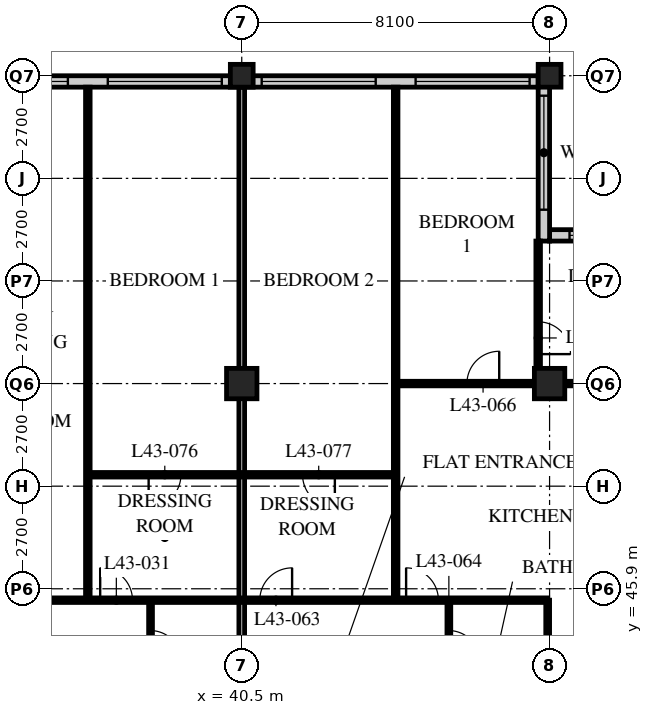
"""IFC4 building model, lengths in metres.
Left out: names, types, materials, properties, quantities, classifications, styles, units other than length and angle.
Written with IfcOpenShell. Run it as: python <this file> out.ifc"""

import sys

from ifc_helpers import new_model, si_unit, direction, frame, frame_2d, origin, origin_2d, place, context, subcontext, project, spatial, rectangle, hollow_rectangle, extrude, element, fill, save


model = new_model("IFC4")
c1 = context("Model", 3, precision=1e-05, world=origin(), true_north=direction((0.0, 1.0)))
c2 = subcontext(c1, "Body", "Model", "MODEL_VIEW")
j1 = project(units=[si_unit("LENGTHUNIT", "METRE"), si_unit("PLANEANGLEUNIT", "RADIAN")], contexts=[c1])
p1 = place(None, origin())
s1 = spatial("IfcSite", under=j1, at=p1, CompositionType="ELEMENT")
p2 = place(p1, origin())
s2 = spatial("IfcBuilding", under=s1, at=p2, CompositionType="ELEMENT")
p3 = place(p2, frame((0.0, 0.0, 170.4)))
s3 = spatial("IfcBuildingStorey", under=s2, at=p3, CompositionType="ELEMENT", Elevation=170.4)
p4 = place(p3, frame((40.5, 51.3, 0.0), z_axis=(0.0, 0.0, 1.0), x_axis=(1.0, 0.0, 0.0)))
e1 = element("IfcColumn", 1, at=p4, inside=s3, PredefinedType="COLUMN", context=c2, shape_type="SweptSolid", body=[
    extrude(hollow_rectangle(XDim=0.8, YDim=0.8, WallThickness=0.08, at=origin_2d()), origin(), (0.0, 0.0, 1.0), 3.6),
])
p5 = place(p3, frame((40.5, 59.4, 0.0), z_axis=(0.0, 0.0, 1.0), x_axis=(1.0, 0.0, 0.0)))
e2 = element("IfcColumn", 2, at=p5, inside=s3, PredefinedType="COLUMN", context=c2, shape_type="SweptSolid", body=[
    extrude(hollow_rectangle(XDim=0.6, YDim=0.6, WallThickness=0.05, at=origin_2d()), origin(), (0.0, 0.0, 1.0), 3.6),
])
p6 = place(p3, frame((48.6, 51.3, 0.0), z_axis=(0.0, 0.0, 1.0), x_axis=(1.0, 0.0, 0.0)))
e3 = element("IfcColumn", 3, at=p6, inside=s3, PredefinedType="COLUMN", context=c2, shape_type="SweptSolid", body=[
    extrude(hollow_rectangle(XDim=0.8, YDim=0.8, WallThickness=0.08, at=origin_2d()), origin(), (0.0, 0.0, 1.0), 3.6),
])
p7 = place(p3, frame((48.6, 59.4, 0.0), z_axis=(0.0, 0.0, 1.0), x_axis=(1.0, 0.0, 0.0)))
e4 = element("IfcColumn", 4, at=p7, inside=s3, PredefinedType="COLUMN", context=c2, shape_type="SweptSolid", body=[
    extrude(hollow_rectangle(XDim=0.6, YDim=0.6, WallThickness=0.05, at=origin_2d()), origin(), (0.0, 0.0, 1.0), 3.6),
])
p8 = place(p3, frame((52.35, 55.2, 0.0), z_axis=(0.0, 0.0, 1.0), x_axis=(-1.0, 0.0, 0.0)))
e5 = element("IfcWall", 5, at=p8, inside=s3, PredefinedType="SOLIDWALL", context=c2, shape_type="SweptSolid", body=[
    extrude(rectangle(XDim=3.75, YDim=0.3, at=frame_2d((1.875, 0.0))), origin(), (0.0, 0.0, 1.0), 3.39),
])
p9 = place(p8, frame((0.225, 0.0, 0.6)))
e6 = element("IfcOpeningElement", 6, at=p9, cuts=e5, PredefinedType="OPENING", context=c2, shape_type="SweptSolid", body=[
    extrude(rectangle(XDim=3.0, YDim=2.0, at=frame_2d((1.5, 1.0))), frame((0.0, 0.16, 0.0), z_axis=(0.0, -1.0, 0.0), x_axis=(1.0, 0.0, 0.0)), (0.0, 0.0, 1.0), 0.32),
])
p10 = place(p3, frame((48.45, 55.05, 0.0), z_axis=(0.0, 0.0, 1.0), x_axis=(0.0, 1.0, 0.0)))
e7 = element("IfcWall", 7, at=p10, inside=s3, PredefinedType="SOLIDWALL", context=c2, shape_type="SweptSolid", body=[
    extrude(rectangle(XDim=4.35, YDim=0.3, at=frame_2d((2.175, 0.0))), origin(), (0.0, 0.0, 1.0), 3.39),
])
p11 = place(p10, frame((0.825, 0.0, 0.6)))
e8 = element("IfcOpeningElement", 8, at=p11, cuts=e7, PredefinedType="OPENING", context=c2, shape_type="SweptSolid", body=[
    extrude(rectangle(XDim=3.0, YDim=2.0, at=frame_2d((1.5, 1.0))), frame((0.0, 0.16, 0.0), z_axis=(0.0, -1.0, 0.0), x_axis=(1.0, 0.0, 0.0)), (0.0, 0.0, 1.0), 0.32),
])
p12 = place(p3, frame((48.3, 59.25, 0.0), z_axis=(0.0, 0.0, 1.0), x_axis=(-1.0, 0.0, 0.0)))
e9 = element("IfcWall", 9, at=p12, inside=s3, PredefinedType="SOLIDWALL", context=c2, shape_type="SweptSolid", body=[
    extrude(rectangle(XDim=40.2, YDim=0.3, at=frame_2d((20.1, 0.0))), origin(), (0.0, 0.0, 1.0), 3.39),
])
p13 = place(p12, frame((0.225, 0.0, 0.6)))
e10 = element("IfcOpeningElement", 10, at=p13, cuts=e9, PredefinedType="OPENING", context=c2, shape_type="SweptSolid", body=[
    extrude(rectangle(XDim=3.0, YDim=2.4, at=frame_2d((1.5, 1.2))), frame((0.0, 0.16, 0.0), z_axis=(0.0, -1.0, 0.0), x_axis=(1.0, 0.0, 0.0)), (0.0, 0.0, 1.0), 0.32),
])
p14 = place(p12, frame((4.275, 0.0, 0.6)))
e11 = element("IfcOpeningElement", 11, at=p14, cuts=e9, PredefinedType="OPENING", context=c2, shape_type="SweptSolid", body=[
    extrude(rectangle(XDim=3.0, YDim=2.4, at=frame_2d((1.5, 1.2))), frame((0.0, 0.16, 0.0), z_axis=(0.0, -1.0, 0.0), x_axis=(1.0, 0.0, 0.0)), (0.0, 0.0, 1.0), 0.32),
])
p15 = place(p12, frame((8.325, 0.0, 0.6)))
e12 = element("IfcOpeningElement", 12, at=p15, cuts=e9, PredefinedType="OPENING", context=c2, shape_type="SweptSolid", body=[
    extrude(rectangle(XDim=3.0, YDim=2.4, at=frame_2d((1.5, 1.2))), frame((0.0, 0.16, 0.0), z_axis=(0.0, -1.0, 0.0), x_axis=(1.0, 0.0, 0.0)), (0.0, 0.0, 1.0), 0.32),
])
p16 = place(p12, frame((12.375, 0.0, 0.6)))
e13 = element("IfcOpeningElement", 13, at=p16, cuts=e9, PredefinedType="OPENING", context=c2, shape_type="SweptSolid", body=[
    extrude(rectangle(XDim=3.0, YDim=2.4, at=frame_2d((1.5, 1.2))), frame((0.0, 0.16, 0.0), z_axis=(0.0, -1.0, 0.0), x_axis=(1.0, 0.0, 0.0)), (0.0, 0.0, 1.0), 0.32),
])
p17 = place(p12, frame((16.425, 0.0, 0.6)))
e14 = element("IfcOpeningElement", 14, at=p17, cuts=e9, PredefinedType="OPENING", context=c2, shape_type="SweptSolid", body=[
    extrude(rectangle(XDim=3.0, YDim=2.4, at=frame_2d((1.5, 1.2))), frame((0.0, 0.16, 0.0), z_axis=(0.0, -1.0, 0.0), x_axis=(1.0, 0.0, 0.0)), (0.0, 0.0, 1.0), 0.32),
])
p18 = place(p12, frame((20.475, 0.0, 0.6)))
e15 = element("IfcOpeningElement", 15, at=p18, cuts=e9, PredefinedType="OPENING", context=c2, shape_type="SweptSolid", body=[
    extrude(rectangle(XDim=3.0, YDim=2.4, at=frame_2d((1.5, 1.2))), frame((0.0, 0.16, 0.0), z_axis=(0.0, -1.0, 0.0), x_axis=(1.0, 0.0, 0.0)), (0.0, 0.0, 1.0), 0.32),
])
p19 = place(p12, frame((24.525, 0.0, 0.6)))
e16 = element("IfcOpeningElement", 16, at=p19, cuts=e9, PredefinedType="OPENING", context=c2, shape_type="SweptSolid", body=[
    extrude(rectangle(XDim=3.0, YDim=2.4, at=frame_2d((1.5, 1.2))), frame((0.0, 0.16, 0.0), z_axis=(0.0, -1.0, 0.0), x_axis=(1.0, 0.0, 0.0)), (0.0, 0.0, 1.0), 0.32),
])
p20 = place(p12, frame((28.575, 0.0, 0.6)))
e17 = element("IfcOpeningElement", 17, at=p20, cuts=e9, PredefinedType="OPENING", context=c2, shape_type="SweptSolid", body=[
    extrude(rectangle(XDim=3.0, YDim=2.4, at=frame_2d((1.5, 1.2))), frame((0.0, 0.16, 0.0), z_axis=(0.0, -1.0, 0.0), x_axis=(1.0, 0.0, 0.0)), (0.0, 0.0, 1.0), 0.32),
])
p21 = place(p12, frame((32.625, 0.0, 0.6)))
e18 = element("IfcOpeningElement", 18, at=p21, cuts=e9, PredefinedType="OPENING", context=c2, shape_type="SweptSolid", body=[
    extrude(rectangle(XDim=3.0, YDim=2.4, at=frame_2d((1.5, 1.2))), frame((0.0, 0.16, 0.0), z_axis=(0.0, -1.0, 0.0), x_axis=(1.0, 0.0, 0.0)), (0.0, 0.0, 1.0), 0.32),
])
p22 = place(p12, frame((36.675, 0.0, 0.6)))
e19 = element("IfcOpeningElement", 19, at=p22, cuts=e9, PredefinedType="OPENING", context=c2, shape_type="SweptSolid", body=[
    extrude(rectangle(XDim=3.0, YDim=2.4, at=frame_2d((1.5, 1.2))), frame((0.0, 0.16, 0.0), z_axis=(0.0, -1.0, 0.0), x_axis=(1.0, 0.0, 0.0)), (0.0, 0.0, 1.0), 0.32),
])
p23 = place(p3, frame((38.1, 43.2, 0.0), z_axis=(0.0, 0.0, 1.0), x_axis=(0.0, 1.0, 0.0)))
e20 = element("IfcWall", 20, at=p23, inside=s3, PredefinedType="PARTITIONING", context=c2, shape_type="SweptSolid", body=[
    extrude(rectangle(XDim=2.4, YDim=0.1, at=frame_2d((1.2, 0.0))), origin(), (0.0, 0.0, 1.0), 3.39),
])
p24 = place(p23, frame((0.8, 0.0, 0.0)))
e21 = element("IfcOpeningElement", 21, at=p24, cuts=e20, PredefinedType="OPENING", context=c2, shape_type="SweptSolid", body=[
    extrude(rectangle(XDim=0.8, YDim=2.1, at=frame_2d((0.4, 1.05))), frame((0.0, 0.06, 0.0), z_axis=(0.0, -1.0, 0.0), x_axis=(1.0, 0.0, 0.0)), (0.0, 0.0, 1.0), 0.12),
])
p25 = place(p3, frame((36.45, 45.6, 0.0), z_axis=(0.0, 0.0, 1.0), x_axis=(0.0, 1.0, 0.0)))
e22 = element("IfcWall", 22, at=p25, inside=s3, PredefinedType="PARTITIONING", context=c2, shape_type="SweptSolid", body=[
    extrude(rectangle(XDim=13.5, YDim=0.12, at=frame_2d((6.75, 0.0))), origin(), (0.0, 0.0, 1.0), 3.39),
])
p26 = place(p3, frame((45.95, 43.2, 0.0), z_axis=(0.0, 0.0, 1.0), x_axis=(0.0, 1.0, 0.0)))
e23 = element("IfcWall", 23, at=p26, inside=s3, PredefinedType="PARTITIONING", context=c2, shape_type="SweptSolid", body=[
    extrude(rectangle(XDim=2.4, YDim=0.1, at=frame_2d((1.2, 0.0))), origin(), (0.0, 0.0, 1.0), 3.39),
])
p27 = place(p26, frame((0.8, 0.0, 0.0)))
e24 = element("IfcOpeningElement", 24, at=p27, cuts=e23, PredefinedType="OPENING", context=c2, shape_type="SweptSolid", body=[
    extrude(rectangle(XDim=0.8, YDim=2.1, at=frame_2d((0.4, 1.05))), frame((0.0, 0.06, 0.0), z_axis=(0.0, -1.0, 0.0), x_axis=(1.0, 0.0, 0.0)), (0.0, 0.0, 1.0), 0.12),
])
p28 = place(p3, frame((48.55, 43.2, 0.0), z_axis=(0.0, 0.0, 1.0), x_axis=(0.0, 1.0, 0.0)))
e25 = element("IfcWall", 25, at=p28, inside=s3, PredefinedType="PARTITIONING", context=c2, shape_type="SweptSolid", body=[
    extrude(rectangle(XDim=2.4, YDim=0.1, at=frame_2d((1.2, 0.0))), origin(), (0.0, 0.0, 1.0), 2.778),
])
p29 = place(p3, frame((44.55, 45.6, 0.0), z_axis=(0.0, 0.0, 1.0), x_axis=(0.0, 1.0, 0.0)))
e26 = element("IfcWall", 26, at=p29, inside=s3, PredefinedType="PARTITIONING", context=c2, shape_type="SweptSolid", body=[
    extrude(rectangle(XDim=13.5, YDim=0.12, at=frame_2d((6.75, 0.0))), origin(), (0.0, 0.0, 1.0), 3.39),
])
p30 = place(p3, frame((44.55, 51.3, 0.0), z_axis=(0.0, 0.0, 1.0), x_axis=(1.0, 0.0, 0.0)))
e27 = element("IfcWall", 27, at=p30, inside=s3, PredefinedType="PARTITIONING", context=c2, shape_type="SweptSolid", body=[
    extrude(rectangle(XDim=7.8, YDim=0.12, at=frame_2d((3.9, 0.0))), origin(), (0.0, 0.0, 1.0), 2.778),
])
p31 = place(p30, frame((1.875, 0.0, 0.0)))
e28 = element("IfcOpeningElement", 28, at=p31, cuts=e27, PredefinedType="OPENING", context=c2, shape_type="SweptSolid", body=[
    extrude(rectangle(XDim=0.85, YDim=2.1, at=frame_2d((0.425, 1.05))), frame((0.0, 0.07, 0.0), z_axis=(0.0, -1.0, 0.0), x_axis=(1.0, 0.0, 0.0)), (0.0, 0.0, 1.0), 0.14),
])
p32 = place(p3, frame((40.5, 43.2, 0.0), z_axis=(0.0, 0.0, 1.0), x_axis=(0.0, 1.0, 0.0)))
e29 = element("IfcWall", 29, at=p32, inside=s3, PredefinedType="PARTITIONING", context=c2, shape_type="SweptSolid", body=[
    extrude(rectangle(XDim=15.9, YDim=0.15, at=frame_2d((7.95, 0.0))), origin(), (0.0, 0.0, 1.0), 2.778),
])
p33 = place(p3, frame((8.15, 45.6, 0.0), z_axis=(0.0, 0.0, 1.0), x_axis=(1.0, 0.0, 0.0)))
e30 = element("IfcWall", 30, at=p33, inside=s3, PredefinedType="PARTITIONING", context=c2, shape_type="SweptSolid", body=[
    extrude(rectangle(XDim=40.4, YDim=0.12, at=frame_2d((20.2, 0.0))), origin(), (0.0, 0.0, 1.0), 3.39),
])
p34 = place(p33, frame((9.025, 0.0, 0.0)))
e31 = element("IfcOpeningElement", 31, at=p34, cuts=e30, PredefinedType="OPENING", context=c2, shape_type="SweptSolid", body=[
    extrude(rectangle(XDim=0.85, YDim=2.1, at=frame_2d((0.425, 1.05))), frame((0.0, 0.07, 0.0), z_axis=(0.0, -1.0, 0.0), x_axis=(1.0, 0.0, 0.0)), (0.0, 0.0, 1.0), 0.14),
])
p35 = place(p33, frame((12.425, 0.0, 0.0)))
e32 = element("IfcOpeningElement", 32, at=p35, cuts=e30, PredefinedType="OPENING", context=c2, shape_type="SweptSolid", body=[
    extrude(rectangle(XDim=0.85, YDim=2.1, at=frame_2d((0.425, 1.05))), frame((0.0, 0.07, 0.0), z_axis=(0.0, -1.0, 0.0), x_axis=(1.0, 0.0, 0.0)), (0.0, 0.0, 1.0), 0.14),
])
p36 = place(p33, frame((17.125, 0.0, 0.0)))
e33 = element("IfcOpeningElement", 33, at=p36, cuts=e30, PredefinedType="OPENING", context=c2, shape_type="SweptSolid", body=[
    extrude(rectangle(XDim=0.85, YDim=2.1, at=frame_2d((0.425, 1.05))), frame((0.0, 0.07, 0.0), z_axis=(0.0, -1.0, 0.0), x_axis=(1.0, 0.0, 0.0)), (0.0, 0.0, 1.0), 0.14),
])
p37 = place(p33, frame((20.525, 0.0, 0.0)))
e34 = element("IfcOpeningElement", 34, at=p37, cuts=e30, PredefinedType="OPENING", context=c2, shape_type="SweptSolid", body=[
    extrude(rectangle(XDim=0.85, YDim=2.1, at=frame_2d((0.425, 1.05))), frame((0.0, 0.07, 0.0), z_axis=(0.0, -1.0, 0.0), x_axis=(1.0, 0.0, 0.0)), (0.0, 0.0, 1.0), 0.14),
])
p38 = place(p33, frame((25.225, 0.0, 0.0)))
e35 = element("IfcOpeningElement", 35, at=p38, cuts=e30, PredefinedType="OPENING", context=c2, shape_type="SweptSolid", body=[
    extrude(rectangle(XDim=0.85, YDim=2.1, at=frame_2d((0.425, 1.05))), frame((0.0, 0.07, 0.0), z_axis=(0.0, -1.0, 0.0), x_axis=(1.0, 0.0, 0.0)), (0.0, 0.0, 1.0), 0.14),
])
p39 = place(p33, frame((28.625, 0.0, 0.0)))
e36 = element("IfcOpeningElement", 36, at=p39, cuts=e30, PredefinedType="OPENING", context=c2, shape_type="SweptSolid", body=[
    extrude(rectangle(XDim=0.85, YDim=2.1, at=frame_2d((0.425, 1.05))), frame((0.0, 0.07, 0.0), z_axis=(0.0, -1.0, 0.0), x_axis=(1.0, 0.0, 0.0)), (0.0, 0.0, 1.0), 0.14),
])
p40 = place(p33, frame((32.825, 0.0, 0.0)))
e37 = element("IfcOpeningElement", 37, at=p40, cuts=e30, PredefinedType="OPENING", context=c2, shape_type="SweptSolid", body=[
    extrude(rectangle(XDim=0.85, YDim=2.1, at=frame_2d((0.425, 1.05))), frame((0.0, 0.07, 0.0), z_axis=(0.0, -1.0, 0.0), x_axis=(1.0, 0.0, 0.0)), (0.0, 0.0, 1.0), 0.14),
])
p41 = place(p33, frame((36.675, 0.0, 0.0)))
e38 = element("IfcOpeningElement", 38, at=p41, cuts=e30, PredefinedType="OPENING", context=c2, shape_type="SweptSolid", body=[
    extrude(rectangle(XDim=0.85, YDim=2.1, at=frame_2d((0.425, 1.05))), frame((0.0, 0.07, 0.0), z_axis=(0.0, -1.0, 0.0), x_axis=(1.0, 0.0, 0.0)), (0.0, 0.0, 1.0), 0.14),
])
p42 = place(p33, frame((6.725, 0.0, 0.0)))
e39 = element("IfcOpeningElement", 39, at=p42, cuts=e30, PredefinedType="OPENING", context=c2, shape_type="SweptSolid", body=[
    extrude(rectangle(XDim=0.85, YDim=2.1, at=frame_2d((0.425, 1.05))), frame((0.0, 0.07, 0.0), z_axis=(0.0, -1.0, 0.0), x_axis=(1.0, 0.0, 0.0)), (0.0, 0.0, 1.0), 0.14),
])
p43 = place(p33, frame((2.875, 0.0, 0.0)))
e40 = element("IfcOpeningElement", 40, at=p43, cuts=e30, PredefinedType="OPENING", context=c2, shape_type="SweptSolid", body=[
    extrude(rectangle(XDim=0.85, YDim=2.1, at=frame_2d((0.425, 1.05))), frame((0.0, 0.07, 0.0), z_axis=(0.0, -1.0, 0.0), x_axis=(1.0, 0.0, 0.0)), (0.0, 0.0, 1.0), 0.14),
])
p44 = place(p3, frame((48.3, 51.3, 0.0), z_axis=(0.0, 0.0, 1.0), x_axis=(0.0, 1.0, 0.0)))
e41 = element("IfcWall", 41, at=p44, inside=s3, PredefinedType="PARTITIONING", context=c2, shape_type="SweptSolid", body=[
    extrude(rectangle(XDim=3.75, YDim=0.12, at=frame_2d((1.875, 0.0))), origin(), (0.0, 0.0, 1.0), 3.39),
])
p45 = place(p44, frame((0.775, 0.0, 0.0)))
e42 = element("IfcOpeningElement", 42, at=p45, cuts=e41, PredefinedType="OPENING", context=c2, shape_type="SweptSolid", body=[
    extrude(rectangle(XDim=0.85, YDim=2.1, at=frame_2d((0.425, 1.05))), frame((0.0, 0.07, 0.0), z_axis=(0.0, -1.0, 0.0), x_axis=(1.0, 0.0, 0.0)), (0.0, 0.0, 1.0), 0.14),
])
p46 = place(p3, frame((36.45, 48.9, 0.0), z_axis=(0.0, 0.0, 1.0), x_axis=(1.0, 0.0, 0.0)))
e43 = element("IfcWall", 43, at=p46, inside=s3, PredefinedType="PARTITIONING", context=c2, shape_type="SweptSolid", body=[
    extrude(rectangle(XDim=8.1, YDim=0.12, at=frame_2d((4.05, 0.0))), origin(), (0.0, 0.0, 1.0), 3.39),
])
p47 = place(p46, frame((1.6, 0.0, 0.0)))
e44 = element("IfcOpeningElement", 44, at=p47, cuts=e43, PredefinedType="OPENING", context=c2, shape_type="SweptSolid", body=[
    extrude(rectangle(XDim=0.85, YDim=2.1, at=frame_2d((0.425, 1.05))), frame((0.0, 0.07, 0.0), z_axis=(0.0, -1.0, 0.0), x_axis=(1.0, 0.0, 0.0)), (0.0, 0.0, 1.0), 0.14),
])
p48 = place(p46, frame((5.65, 0.0, 0.0)))
e45 = element("IfcOpeningElement", 45, at=p48, cuts=e43, PredefinedType="OPENING", context=c2, shape_type="SweptSolid", body=[
    extrude(rectangle(XDim=0.85, YDim=2.1, at=frame_2d((0.425, 1.05))), frame((0.0, 0.07, 0.0), z_axis=(0.0, -1.0, 0.0), x_axis=(1.0, 0.0, 0.0)), (0.0, 0.0, 1.0), 0.14),
])
p49 = place(p9, origin())
e46 = element("IfcWindow", 46, at=p49, inside=s3, PartitioningType="SINGLE_PANEL", PredefinedType="WINDOW", context=c2, shape_type="SweptSolid", body=[
    extrude(rectangle(XDim=3.0, YDim=2.0, at=frame_2d((1.5, 1.0))), frame((0.0, 0.03, 0.0), z_axis=(0.0, -1.0, 0.0), x_axis=(1.0, 0.0, 0.0)), (0.0, 0.0, 1.0), 0.06),
])
fill(e6, e46)
p50 = place(p11, origin())
e47 = element("IfcWindow", 47, at=p50, inside=s3, PartitioningType="SINGLE_PANEL", PredefinedType="WINDOW", context=c2, shape_type="SweptSolid", body=[
    extrude(rectangle(XDim=3.0, YDim=2.0, at=frame_2d((1.5, 1.0))), frame((0.0, 0.03, 0.0), z_axis=(0.0, -1.0, 0.0), x_axis=(1.0, 0.0, 0.0)), (0.0, 0.0, 1.0), 0.06),
])
fill(e8, e47)
p51 = place(p13, origin())
e48 = element("IfcWindow", 48, at=p51, inside=s3, PartitioningType="SINGLE_PANEL", PredefinedType="WINDOW", context=c2, shape_type="SweptSolid", body=[
    extrude(rectangle(XDim=3.0, YDim=2.4, at=frame_2d((1.5, 1.2))), frame((0.0, 0.03, 0.0), z_axis=(0.0, -1.0, 0.0), x_axis=(1.0, 0.0, 0.0)), (0.0, 0.0, 1.0), 0.06),
])
fill(e10, e48)
p52 = place(p14, origin())
e49 = element("IfcWindow", 49, at=p52, inside=s3, PartitioningType="SINGLE_PANEL", PredefinedType="WINDOW", context=c2, shape_type="SweptSolid", body=[
    extrude(rectangle(XDim=3.0, YDim=2.4, at=frame_2d((1.5, 1.2))), frame((0.0, 0.03, 0.0), z_axis=(0.0, -1.0, 0.0), x_axis=(1.0, 0.0, 0.0)), (0.0, 0.0, 1.0), 0.06),
])
fill(e11, e49)
p53 = place(p15, origin())
e50 = element("IfcWindow", 50, at=p53, inside=s3, PartitioningType="SINGLE_PANEL", PredefinedType="WINDOW", context=c2, shape_type="SweptSolid", body=[
    extrude(rectangle(XDim=3.0, YDim=2.4, at=frame_2d((1.5, 1.2))), frame((0.0, 0.03, 0.0), z_axis=(0.0, -1.0, 0.0), x_axis=(1.0, 0.0, 0.0)), (0.0, 0.0, 1.0), 0.06),
])
fill(e12, e50)
p54 = place(p16, origin())
e51 = element("IfcWindow", 51, at=p54, inside=s3, PartitioningType="SINGLE_PANEL", PredefinedType="WINDOW", context=c2, shape_type="SweptSolid", body=[
    extrude(rectangle(XDim=3.0, YDim=2.4, at=frame_2d((1.5, 1.2))), frame((0.0, 0.03, 0.0), z_axis=(0.0, -1.0, 0.0), x_axis=(1.0, 0.0, 0.0)), (0.0, 0.0, 1.0), 0.06),
])
fill(e13, e51)
p55 = place(p24, origin())
e52 = element("IfcDoor", 52, at=p55, inside=s3, OperationType="SINGLE_SWING_RIGHT", PredefinedType="DOOR", context=c2, shape_type="SweptSolid", body=[
    extrude(rectangle(XDim=0.8, YDim=2.1, at=frame_2d((0.4, 1.05))), frame((0.0, 0.025, 0.0), z_axis=(0.0, -1.0, 0.0), x_axis=(1.0, 0.0, 0.0)), (0.0, 0.0, 1.0), 0.05),
])
fill(e21, e52)
p56 = place(p39, origin())
e53 = element("IfcDoor", 53, at=p56, inside=s3, OperationType="SINGLE_SWING_LEFT", PredefinedType="DOOR", context=c2, shape_type="SweptSolid", body=[
    extrude(rectangle(XDim=0.85, YDim=2.1, at=frame_2d((0.425, 1.05))), frame((0.0, 0.025, 0.0), z_axis=(0.0, -1.0, 0.0), x_axis=(1.0, 0.0, 0.0)), (0.0, 0.0, 1.0), 0.05),
])
fill(e36, e53)
p57 = place(p40, origin())
e54 = element("IfcDoor", 54, at=p57, inside=s3, OperationType="SINGLE_SWING_RIGHT", PredefinedType="DOOR", context=c2, shape_type="SweptSolid", body=[
    extrude(rectangle(XDim=0.85, YDim=2.1, at=frame_2d((0.425, 1.05))), frame((0.0, 0.025, 0.0), z_axis=(0.0, -1.0, 0.0), x_axis=(1.0, 0.0, 0.0)), (0.0, 0.0, 1.0), 0.05),
])
fill(e37, e54)
p58 = place(p27, origin())
e55 = element("IfcDoor", 55, at=p58, inside=s3, OperationType="SINGLE_SWING_RIGHT", PredefinedType="DOOR", context=c2, shape_type="SweptSolid", body=[
    extrude(rectangle(XDim=0.8, YDim=2.1, at=frame_2d((0.4, 1.05))), frame((0.0, 0.025, 0.0), z_axis=(0.0, -1.0, 0.0), x_axis=(1.0, 0.0, 0.0)), (0.0, 0.0, 1.0), 0.05),
])
fill(e24, e55)
p59 = place(p41, origin())
e56 = element("IfcDoor", 56, at=p59, inside=s3, OperationType="SINGLE_SWING_LEFT", PredefinedType="DOOR", context=c2, shape_type="SweptSolid", body=[
    extrude(rectangle(XDim=0.85, YDim=2.1, at=frame_2d((0.425, 1.05))), frame((0.0, 0.025, 0.0), z_axis=(0.0, -1.0, 0.0), x_axis=(1.0, 0.0, 0.0)), (0.0, 0.0, 1.0), 0.05),
])
fill(e38, e56)
p60 = place(p31, origin())
e57 = element("IfcDoor", 57, at=p60, inside=s3, OperationType="SINGLE_SWING_RIGHT", PredefinedType="DOOR", context=c2, shape_type="SweptSolid", body=[
    extrude(rectangle(XDim=0.85, YDim=2.1, at=frame_2d((0.425, 1.05))), frame((0.0, 0.025, 0.0), z_axis=(0.0, -1.0, 0.0), x_axis=(1.0, 0.0, 0.0)), (0.0, 0.0, 1.0), 0.05),
])
fill(e28, e57)
p61 = place(p45, origin())
e58 = element("IfcDoor", 58, at=p61, inside=s3, OperationType="SINGLE_SWING_RIGHT", PredefinedType="DOOR", context=c2, shape_type="SweptSolid", body=[
    extrude(rectangle(XDim=0.85, YDim=2.1, at=frame_2d((0.425, 1.05))), frame((0.0, 0.025, 0.0), z_axis=(0.0, -1.0, 0.0), x_axis=(1.0, 0.0, 0.0)), (0.0, 0.0, 1.0), 0.05),
])
fill(e42, e58)
p62 = place(p47, origin())
e59 = element("IfcDoor", 59, at=p62, inside=s3, OperationType="SINGLE_SWING_RIGHT", PredefinedType="DOOR", context=c2, shape_type="SweptSolid", body=[
    extrude(rectangle(XDim=0.85, YDim=2.1, at=frame_2d((0.425, 1.05))), frame((0.0, 0.025, 0.0), z_axis=(0.0, -1.0, 0.0), x_axis=(1.0, 0.0, 0.0)), (0.0, 0.0, 1.0), 0.05),
])
fill(e44, e59)
p63 = place(p48, origin())
e60 = element("IfcDoor", 60, at=p63, inside=s3, OperationType="SINGLE_SWING_LEFT", PredefinedType="DOOR", context=c2, shape_type="SweptSolid", body=[
    extrude(rectangle(XDim=0.85, YDim=2.1, at=frame_2d((0.425, 1.05))), frame((0.0, 0.025, 0.0), z_axis=(0.0, -1.0, 0.0), x_axis=(1.0, 0.0, 0.0)), (0.0, 0.0, 1.0), 0.05),
])
fill(e45, e60)
save(model, sys.argv[1])
